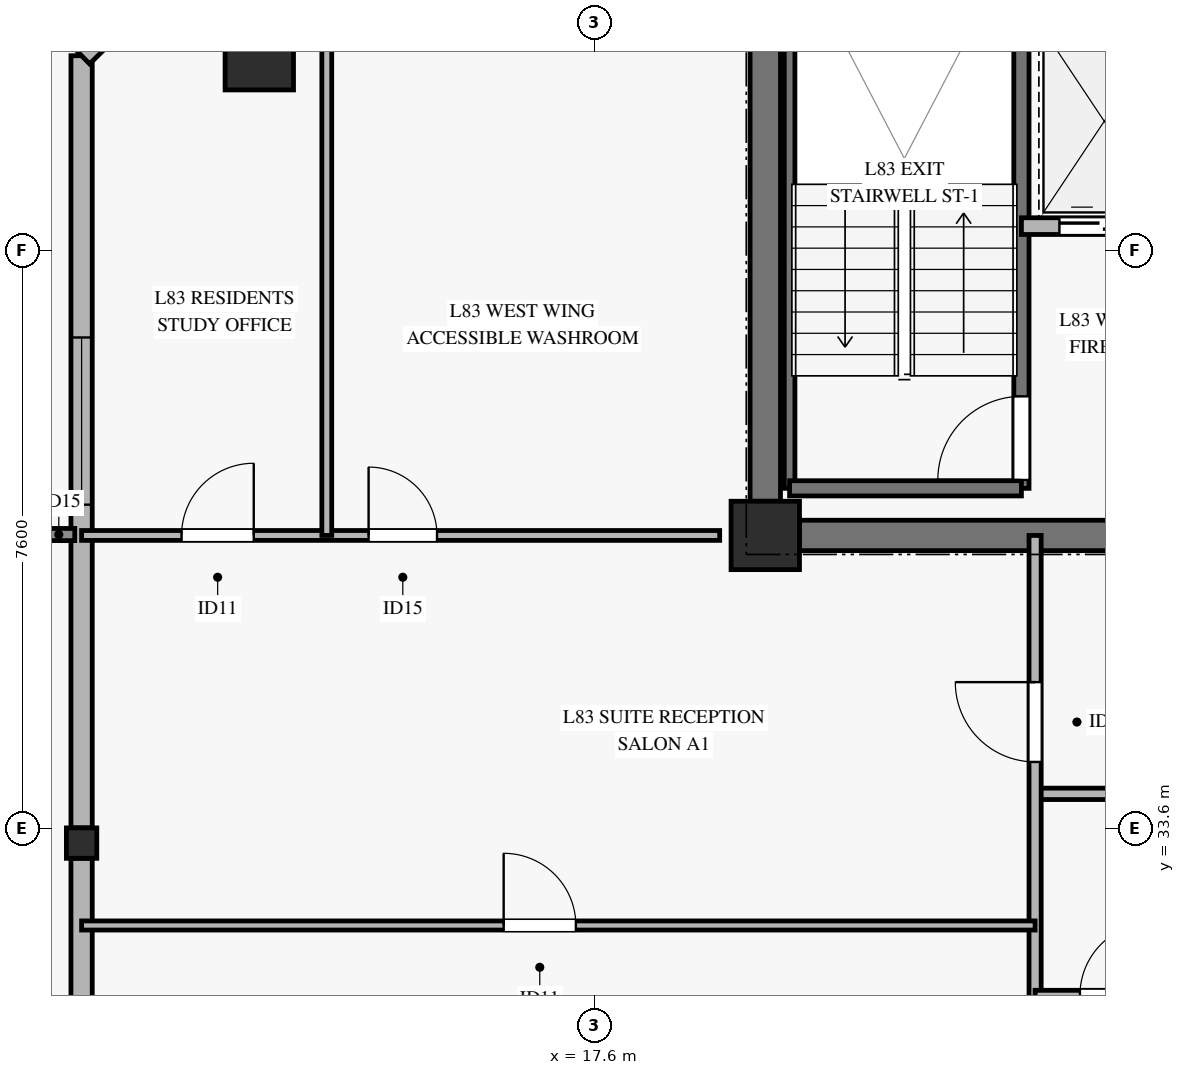
"""IFC4 building model, lengths in metres.
Left out: names, types, materials, properties, quantities, classifications, styles, units other than length and angle.
Written with IfcOpenShell. Run it as: python <this file> out.ifc"""

import sys

from ifc_helpers import new_model, si_unit, direction, frame, frame_2d, origin, origin_2d, place, context, subcontext, project, spatial, rectangle, hollow_rectangle, extrude, source, transform, mapped, element, fill, save


model = new_model("IFC4")
c1 = context("Model", 3, precision=1e-05, world=origin(), true_north=direction((0.0, 1.0)))
c2 = subcontext(c1, "Body", "Model", "MODEL_VIEW")
j1 = project(units=[si_unit("LENGTHUNIT", "METRE"), si_unit("PLANEANGLEUNIT", "RADIAN")], contexts=[c1])
p1 = place(None, origin())
s1 = spatial("IfcSite", under=j1, at=p1, CompositionType="ELEMENT")
p2 = place(p1, origin())
s2 = spatial("IfcBuilding", under=s1, at=p2, CompositionType="ELEMENT")
p3 = place(p2, frame((0.0, 0.0, 321.0)))
s3 = spatial("IfcBuildingStorey", under=s2, at=p3, CompositionType="ELEMENT", Elevation=321.0)
m1 = source(origin(), c2, "Body", "SweptSolid", [
    extrude(rectangle(XDim=0.9, YDim=0.9, at=origin_2d()), origin(), (0.0, 0.0, 1.0), 3.185),
])
p4 = place(p3, frame((19.85, 37.45, 0.0), z_axis=(0.0, 0.0, 1.0), x_axis=(1.0, 0.0, 0.0)))
e1 = element("IfcColumn", 1, at=p4, inside=s3, PredefinedType="PILASTER", context=c2, shape_type="MappedRepresentation", body=[
    mapped(m1, transform((0.0, 0.0, 0.0), x_axis=(1.0, 0.0, 0.0), y_axis=(0.0, 1.0, 0.0), z_axis=(0.0, 0.0, 1.0), scale=1.0)),
])
p5 = place(p3, frame((20.3, 37.45, 0.0), z_axis=(0.0, 0.0, 1.0), x_axis=(1.0, 0.0, 0.0)))
e2 = element("IfcWall", 2, at=p5, inside=s3, PredefinedType="SHEAR", context=c2, shape_type="SweptSolid", body=[
    extrude(rectangle(XDim=10.05, YDim=0.4, at=frame_2d((5.025, 0.0))), origin(), (0.0, 0.0, 1.0), 3.185),
])
p6 = place(p5, frame((4.25, 0.0, 0.0)))
e3 = element("IfcOpeningElement", 3, at=p6, cuts=e2, PredefinedType="OPENING", context=c2, shape_type="SweptSolid", body=[
    extrude(rectangle(XDim=1.2, YDim=2.15, at=frame_2d((0.6, 1.075))), frame((0.0, 0.21, 0.0), z_axis=(0.0, -1.0, 0.0), x_axis=(1.0, 0.0, 0.0)), (0.0, 0.0, 1.0), 0.42),
])
p7 = place(p3, frame((19.85, 37.9, 0.0), z_axis=(0.0, 0.0, 1.0), x_axis=(0.0, 1.0, 0.0)))
e4 = element("IfcWall", 4, at=p7, inside=s3, PredefinedType="SHEAR", context=c2, shape_type="SweptSolid", body=[
    extrude(rectangle(XDim=8.2, YDim=0.4, at=frame_2d((4.1, 0.0))), origin(), (0.0, 0.0, 1.0), 3.185),
])
m2 = source(origin(), c2, "Body", "SweptSolid", [
    extrude(hollow_rectangle(XDim=0.9, YDim=0.9, WallThickness=0.04, at=origin_2d()), origin(), (0.0, 0.0, 1.0), 3.207),
])
p8 = place(p3, frame((13.193, 43.762, 0.0), z_axis=(0.115039919341, 0.014389506787, 0.993256643095), x_axis=(-0.12411555831, 0.992267770405, 0.0)))
e5 = element("IfcColumn", 5, at=p8, inside=s3, PredefinedType="COLUMN", context=c2, shape_type="MappedRepresentation", body=[
    mapped(m2, transform((0.0, 0.0, 0.0), x_axis=(1.0, 0.0, 0.0), y_axis=(0.0, 1.0, 0.0), z_axis=(0.0, 0.0, 1.0), scale=1.0)),
])
m3 = source(origin(), c2, "Body", "SweptSolid", [
    extrude(hollow_rectangle(XDim=0.4, YDim=0.4, WallThickness=0.02, at=origin_2d()), origin(), (0.0, 0.0, 1.0), 3.246),
])
p9 = place(p3, frame((10.855, 33.402, 0.0), z_axis=(0.127877909332, 0.14352414765, 0.981350120674), x_axis=(-0.746631572004, 0.665237773798, 0.0)))
e6 = element("IfcColumn", 6, at=p9, inside=s3, PredefinedType="COLUMN", context=c2, shape_type="MappedRepresentation", body=[
    mapped(m3, transform((0.0, 0.0, 0.0), x_axis=(1.0, 0.0, 0.0), y_axis=(0.0, 1.0, 0.0), z_axis=(0.0, 0.0, 1.0), scale=1.0)),
])
p10 = place(p3, frame((10.855, 23.042, 0.0), z_axis=(0.0, 0.0, 1.0), x_axis=(0.0, 1.0, 0.0)))
e7 = element("IfcWall", 7, at=p10, inside=s3, PredefinedType="SOLIDWALL", context=c2, shape_type="SweptSolid", body=[
    extrude(rectangle(XDim=10.16, YDim=0.28, at=frame_2d((5.08, 0.0))), origin(), (0.0, 0.0, 1.0), 2.815),
])
p11 = place(p3, frame((10.855, 33.602, 0.0), z_axis=(0.0, 0.0, 1.0), x_axis=(0.0, 1.0, 0.0)))
e8 = element("IfcWall", 8, at=p11, inside=s3, PredefinedType="SOLIDWALL", context=c2, shape_type="SweptSolid", body=[
    extrude(rectangle(XDim=10.16, YDim=0.28, at=frame_2d((5.08, 0.0))), origin(), (0.0, 0.0, 1.0), 2.815),
])
p12 = place(p11, frame((4.253, 0.0, 0.45)))
e9 = element("IfcOpeningElement", 9, at=p12, cuts=e8, PredefinedType="OPENING", context=c2, shape_type="SweptSolid", body=[
    extrude(rectangle(XDim=2.2, YDim=2.1, at=frame_2d((1.1, 1.05))), frame((0.0, 0.15, 0.0), z_axis=(0.0, -1.0, 0.0), x_axis=(1.0, 0.0, 0.0)), (0.0, 0.0, 1.0), 0.3),
])
p13 = place(p3, frame((13.393, 46.25, 0.0), z_axis=(0.0, 0.0, 1.0), x_axis=(-0.714112563287, -0.700030890001, 0.0)))
e10 = element("IfcWall", 10, at=p13, inside=s3, PredefinedType="SOLIDWALL", context=c2, shape_type="SweptSolid", body=[
    extrude(rectangle(XDim=3.554, YDim=0.3, at=frame_2d((1.777, 0.0))), origin(), (0.0, 0.0, 1.0), 2.815),
])
p14 = place(p13, frame((0.977, 0.0, 0.45)))
e11 = element("IfcOpeningElement", 11, at=p14, cuts=e10, PredefinedType="OPENING", context=c2, shape_type="SweptSolid", body=[
    extrude(rectangle(XDim=1.6, YDim=2.0, at=frame_2d((0.8, 1.0))), frame((0.0, 0.16, 0.0), z_axis=(0.0, -1.0, 0.0), x_axis=(1.0, 0.0, 0.0)), (0.0, 0.0, 1.0), 0.32),
])
p15 = place(p3, frame((20.17, 38.07, 0.0), z_axis=(0.0, 0.0, 1.0), x_axis=(0.0, 1.0, 0.0)))
e12 = element("IfcWall", 12, at=p15, inside=s3, PredefinedType="SOLIDWALL", context=c2, shape_type="SweptSolid", body=[
    extrude(rectangle(XDim=7.25, YDim=0.14, at=frame_2d((3.625, 0.0))), origin(), (0.0, 0.0, 1.0), 3.4),
])
p16 = place(p3, frame((23.22, 38.07, 0.0), z_axis=(0.0, 0.0, 1.0), x_axis=(0.0, 1.0, 0.0)))
e13 = element("IfcWall", 13, at=p16, inside=s3, PredefinedType="SOLIDWALL", context=c2, shape_type="SweptSolid", body=[
    extrude(rectangle(XDim=7.25, YDim=0.2, at=frame_2d((3.625, 0.0))), origin(), (0.0, 0.0, 1.0), 3.4),
])
p17 = place(p16, frame((0.11, 0.0, 0.0)))
e14 = element("IfcOpeningElement", 14, at=p17, cuts=e13, PredefinedType="OPENING", context=c2, shape_type="SweptSolid", body=[
    extrude(rectangle(XDim=1.1, YDim=2.15, at=frame_2d((0.55, 1.075))), frame((0.0, 0.11, 0.0), z_axis=(0.0, -1.0, 0.0), x_axis=(1.0, 0.0, 0.0)), (0.0, 0.0, 1.0), 0.22),
])
p18 = place(p3, frame((20.17, 38.07, 0.0), z_axis=(0.0, 0.0, 1.0), x_axis=(1.0, 0.0, 0.0)))
e15 = element("IfcWall", 15, at=p18, inside=s3, PredefinedType="SOLIDWALL", context=c2, shape_type="SweptSolid", body=[
    extrude(rectangle(XDim=3.05, YDim=0.2, at=frame_2d((1.525, 0.0))), origin(), (0.0, 0.0, 1.0), 3.4),
])
p19 = place(p3, frame((23.22, 41.52, 0.0), z_axis=(0.0, 0.0, 1.0), x_axis=(1.0, 0.0, 0.0)))
e16 = element("IfcWall", 16, at=p19, inside=s3, PredefinedType="SOLIDWALL", context=c2, shape_type="SweptSolid", body=[
    extrude(rectangle(XDim=3.92, YDim=0.22, at=frame_2d((1.96, 0.0))), origin(), (0.0, 0.0, 1.0), 3.185),
])
p20 = place(p19, frame((0.5, 0.0, 0.0)))
e17 = element("IfcOpeningElement", 17, at=p20, cuts=e16, PredefinedType="OPENING", context=c2, shape_type="SweptSolid", body=[
    extrude(rectangle(XDim=1.1, YDim=2.2, at=frame_2d((0.55, 1.1))), frame((0.0, 0.12, 0.0), z_axis=(0.0, -1.0, 0.0), x_axis=(1.0, 0.0, 0.0)), (0.0, 0.0, 1.0), 0.24),
])
p21 = place(p19, frame((2.4, 0.0, 0.0)))
e18 = element("IfcOpeningElement", 18, at=p21, cuts=e16, PredefinedType="OPENING", context=c2, shape_type="SweptSolid", body=[
    extrude(rectangle(XDim=1.1, YDim=2.2, at=frame_2d((0.55, 1.1))), frame((0.0, 0.12, 0.0), z_axis=(0.0, -1.0, 0.0), x_axis=(1.0, 0.0, 0.0)), (0.0, 0.0, 1.0), 0.24),
])
p22 = place(p3, frame((23.4, 34.05, 0.0), z_axis=(0.0, 0.0, 1.0), x_axis=(1.0, 0.0, 0.0)))
e19 = element("IfcWall", 19, at=p22, inside=s3, PredefinedType="PARTITIONING", context=c2, shape_type="SweptSolid", body=[
    extrude(rectangle(XDim=20.9, YDim=0.15, at=frame_2d((10.45, 0.0))), origin(), (0.0, 0.0, 1.0), 2.47),
])
p23 = place(p22, frame((3.275, 0.0, 0.0)))
e20 = element("IfcOpeningElement", 20, at=p23, cuts=e19, PredefinedType="OPENING", context=c2, shape_type="SweptSolid", body=[
    extrude(rectangle(XDim=1.05, YDim=2.15, at=frame_2d((0.525, 1.075))), frame((0.0, 0.085, 0.0), z_axis=(0.0, -1.0, 0.0), x_axis=(1.0, 0.0, 0.0)), (0.0, 0.0, 1.0), 0.17),
])
p24 = place(p22, frame((10.775, 0.0, 0.0)))
e21 = element("IfcOpeningElement", 21, at=p24, cuts=e19, PredefinedType="OPENING", context=c2, shape_type="SweptSolid", body=[
    extrude(rectangle(XDim=1.05, YDim=2.15, at=frame_2d((0.525, 1.075))), frame((0.0, 0.085, 0.0), z_axis=(0.0, -1.0, 0.0), x_axis=(1.0, 0.0, 0.0)), (0.0, 0.0, 1.0), 0.17),
])
p25 = place(p22, frame((17.525, 0.0, 0.0)))
e22 = element("IfcOpeningElement", 22, at=p25, cuts=e19, PredefinedType="OPENING", context=c2, shape_type="SweptSolid", body=[
    extrude(rectangle(XDim=1.05, YDim=2.15, at=frame_2d((0.525, 1.075))), frame((0.0, 0.085, 0.0), z_axis=(0.0, -1.0, 0.0), x_axis=(1.0, 0.0, 0.0)), (0.0, 0.0, 1.0), 0.17),
])
p26 = place(p3, frame((23.4, 20.704, 0.0), z_axis=(0.0, 0.0, 1.0), x_axis=(0.0, 1.0, 0.0)))
e23 = element("IfcWall", 23, at=p26, inside=s3, PredefinedType="PARTITIONING", context=c2, shape_type="SweptSolid", body=[
    extrude(rectangle(XDim=16.746, YDim=0.16, at=frame_2d((8.373, 0.0))), origin(), (0.0, 0.0, 1.0), 2.77),
])
p27 = place(p26, frame((13.766, 0.0, 0.0)))
e24 = element("IfcOpeningElement", 24, at=p27, cuts=e23, PredefinedType="OPENING", context=c2, shape_type="SweptSolid", body=[
    extrude(rectangle(XDim=1.05, YDim=2.15, at=frame_2d((0.525, 1.075))), frame((0.0, 0.09, 0.0), z_axis=(0.0, -1.0, 0.0), x_axis=(1.0, 0.0, 0.0)), (0.0, 0.0, 1.0), 0.18),
])
p28 = place(p3, frame((10.855, 32.318, 0.0), z_axis=(0.0, 0.0, 1.0), x_axis=(1.0, 0.0, 0.0)))
e25 = element("IfcWall", 25, at=p28, inside=s3, PredefinedType="PARTITIONING", context=c2, shape_type="SweptSolid", body=[
    extrude(rectangle(XDim=12.545, YDim=0.12, at=frame_2d((6.272, 0.0))), origin(), (0.0, 0.0, 1.0), 2.47),
])
p29 = place(p28, frame((5.553, 0.0, 0.0)))
e26 = element("IfcOpeningElement", 26, at=p29, cuts=e25, PredefinedType="OPENING", context=c2, shape_type="SweptSolid", body=[
    extrude(rectangle(XDim=0.95, YDim=2.1, at=frame_2d((0.475, 1.05))), frame((0.0, 0.07, 0.0), z_axis=(0.0, -1.0, 0.0), x_axis=(1.0, 0.0, 0.0)), (0.0, 0.0, 1.0), 0.14),
])
p30 = place(p3, frame((23.4, 31.4, 0.0), z_axis=(0.0, 0.0, 1.0), x_axis=(1.0, 0.0, 0.0)))
e27 = element("IfcWall", 27, at=p30, inside=s3, PredefinedType="PARTITIONING", context=c2, shape_type="SweptSolid", body=[
    extrude(rectangle(XDim=1.89, YDim=0.13, at=frame_2d((0.945, 0.0))), origin(), (0.0, 0.0, 1.0), 3.185),
])
p31 = place(p30, frame((0.59, 0.0, 0.0)))
e28 = element("IfcOpeningElement", 28, at=p31, cuts=e27, PredefinedType="OPENING", context=c2, shape_type="SweptSolid", body=[
    extrude(rectangle(XDim=0.95, YDim=2.1, at=frame_2d((0.475, 1.05))), frame((0.0, 0.075, 0.0), z_axis=(0.0, -1.0, 0.0), x_axis=(1.0, 0.0, 0.0)), (0.0, 0.0, 1.0), 0.15),
])
p32 = place(p3, frame((10.855, 37.45, 0.0), z_axis=(0.0, 0.0, 1.0), x_axis=(1.0, 0.0, 0.0)))
e29 = element("IfcWall", 29, at=p32, inside=s3, PredefinedType="PARTITIONING", context=c2, shape_type="SweptSolid", body=[
    extrude(rectangle(XDim=8.395, YDim=0.13, at=frame_2d((4.198, 0.0))), origin(), (0.0, 0.0, 1.0), 2.82),
])
p33 = place(p32, frame((1.315, 0.0, 0.0)))
e30 = element("IfcOpeningElement", 30, at=p33, cuts=e29, PredefinedType="OPENING", context=c2, shape_type="SweptSolid", body=[
    extrude(rectangle(XDim=0.95, YDim=2.1, at=frame_2d((0.475, 1.05))), frame((0.0, 0.075, 0.0), z_axis=(0.0, -1.0, 0.0), x_axis=(1.0, 0.0, 0.0)), (0.0, 0.0, 1.0), 0.15),
])
p34 = place(p32, frame((3.776, 0.0, 0.0)))
e31 = element("IfcOpeningElement", 31, at=p34, cuts=e29, PredefinedType="OPENING", context=c2, shape_type="SweptSolid", body=[
    extrude(rectangle(XDim=0.9, YDim=2.1, at=frame_2d((0.45, 1.05))), frame((0.0, 0.075, 0.0), z_axis=(0.0, -1.0, 0.0), x_axis=(1.0, 0.0, 0.0)), (0.0, 0.0, 1.0), 0.15),
])
p35 = place(p3, frame((14.081, 37.45, 0.0), z_axis=(0.0, 0.0, 1.0), x_axis=(0.0, 1.0, 0.0)))
e32 = element("IfcWall", 32, at=p35, inside=s3, PredefinedType="PARTITIONING", context=c2, shape_type="SweptSolid", body=[
    extrude(rectangle(XDim=8.8, YDim=0.13, at=frame_2d((4.4, 0.0))), origin(), (0.0, 0.0, 1.0), 3.185),
])
m4 = source(origin(), c2, "Body", "SweptSolid", [
    extrude(rectangle(XDim=2.2, YDim=2.1, at=frame_2d((1.1, 1.05))), frame((0.0, 0.03, 0.0), z_axis=(0.0, -1.0, 0.0), x_axis=(1.0, 0.0, 0.0)), (0.0, 0.0, 1.0), 0.06),
])
p36 = place(p12, origin())
e33 = element("IfcWindow", 33, at=p36, inside=s3, PartitioningType="SINGLE_PANEL", PredefinedType="WINDOW", context=c2, shape_type="MappedRepresentation", body=[
    mapped(m4, transform((0.0, 0.0, 0.0), x_axis=(1.0, 0.0, 0.0), y_axis=(0.0, 1.0, 0.0), z_axis=(0.0, 0.0, 1.0), scale=1.0)),
])
fill(e9, e33)
m5 = source(origin(), c2, "Body", "SweptSolid", [
    extrude(rectangle(XDim=1.1, YDim=2.15, at=frame_2d((0.55, 1.075))), frame((0.0, 0.025, 0.0), z_axis=(0.0, -1.0, 0.0), x_axis=(1.0, 0.0, 0.0)), (0.0, 0.0, 1.0), 0.05),
])
p37 = place(p17, origin())
e34 = element("IfcDoor", 34, at=p37, inside=s3, OperationType="SINGLE_SWING_LEFT", PredefinedType="DOOR", context=c2, shape_type="MappedRepresentation", body=[
    mapped(m5, transform((0.0, 0.0, 0.0), x_axis=(1.0, 0.0, 0.0), y_axis=(0.0, 1.0, 0.0), z_axis=(0.0, 0.0, 1.0), scale=1.0)),
])
fill(e14, e34)
m6 = source(origin(), c2, "Body", "SweptSolid", [
    extrude(rectangle(XDim=1.1, YDim=2.2, at=frame_2d((0.55, 1.1))), frame((0.0, 0.025, 0.0), z_axis=(0.0, -1.0, 0.0), x_axis=(1.0, 0.0, 0.0)), (0.0, 0.0, 1.0), 0.05),
])
p38 = place(p20, origin())
e35 = element("IfcDoor", 35, at=p38, inside=s3, OperationType="SLIDING_TO_LEFT", PredefinedType="DOOR", context=c2, shape_type="MappedRepresentation", body=[
    mapped(m6, transform((0.0, 0.0, 0.0), x_axis=(1.0, 0.0, 0.0), y_axis=(0.0, 1.0, 0.0), z_axis=(0.0, 0.0, 1.0), scale=1.0)),
])
fill(e17, e35)
m7 = source(origin(), c2, "Body", "SweptSolid", [
    extrude(rectangle(XDim=1.05, YDim=2.15, at=frame_2d((0.525, 1.075))), frame((0.0, 0.025, 0.0), z_axis=(0.0, -1.0, 0.0), x_axis=(1.0, 0.0, 0.0)), (0.0, 0.0, 1.0), 0.05),
])
p39 = place(p27, origin())
e36 = element("IfcDoor", 36, at=p39, inside=s3, OperationType="SINGLE_SWING_RIGHT", PredefinedType="DOOR", context=c2, shape_type="MappedRepresentation", body=[
    mapped(m7, transform((0.0, 0.0, 0.0), x_axis=(1.0, 0.0, 0.0), y_axis=(0.0, 1.0, 0.0), z_axis=(0.0, 0.0, 1.0), scale=1.0)),
])
fill(e24, e36)
m8 = source(origin(), c2, "Body", "SweptSolid", [
    extrude(rectangle(XDim=0.95, YDim=2.1, at=frame_2d((0.475, 1.05))), frame((0.0, 0.025, 0.0), z_axis=(0.0, -1.0, 0.0), x_axis=(1.0, 0.0, 0.0)), (0.0, 0.0, 1.0), 0.05),
])
p40 = place(p29, origin())
e37 = element("IfcDoor", 37, at=p40, inside=s3, OperationType="SINGLE_SWING_LEFT", PredefinedType="DOOR", context=c2, shape_type="MappedRepresentation", body=[
    mapped(m8, transform((0.0, 0.0, 0.0), x_axis=(1.0, 0.0, 0.0), y_axis=(0.0, 1.0, 0.0), z_axis=(0.0, 0.0, 1.0), scale=1.0)),
])
fill(e26, e37)
p41 = place(p31, origin())
e38 = element("IfcDoor", 38, at=p41, inside=s3, OperationType="SINGLE_SWING_RIGHT", PredefinedType="DOOR", context=c2, shape_type="MappedRepresentation", body=[
    mapped(m8, transform((0.0, 0.0, 0.0), x_axis=(1.0, 0.0, 0.0), y_axis=(0.0, 1.0, 0.0), z_axis=(0.0, 0.0, 1.0), scale=1.0)),
])
fill(e28, e38)
p42 = place(p33, origin())
e39 = element("IfcDoor", 39, at=p42, inside=s3, OperationType="SINGLE_SWING_RIGHT", PredefinedType="DOOR", context=c2, shape_type="MappedRepresentation", body=[
    mapped(m8, transform((0.0, 0.0, 0.0), x_axis=(1.0, 0.0, 0.0), y_axis=(0.0, 1.0, 0.0), z_axis=(0.0, 0.0, 1.0), scale=1.0)),
])
fill(e30, e39)
m9 = source(origin(), c2, "Body", "SweptSolid", [
    extrude(rectangle(XDim=0.9, YDim=2.1, at=frame_2d((0.45, 1.05))), frame((0.0, 0.025, 0.0), z_axis=(0.0, -1.0, 0.0), x_axis=(1.0, 0.0, 0.0)), (0.0, 0.0, 1.0), 0.05),
])
p43 = place(p34, origin())
e40 = element("IfcDoor", 40, at=p43, inside=s3, OperationType="SINGLE_SWING_LEFT", PredefinedType="DOOR", context=c2, shape_type="MappedRepresentation", body=[
    mapped(m9, transform((0.0, 0.0, 0.0), x_axis=(1.0, 0.0, 0.0), y_axis=(0.0, 1.0, 0.0), z_axis=(0.0, 0.0, 1.0), scale=1.0)),
])
fill(e31, e40)
save(model, sys.argv[1])
